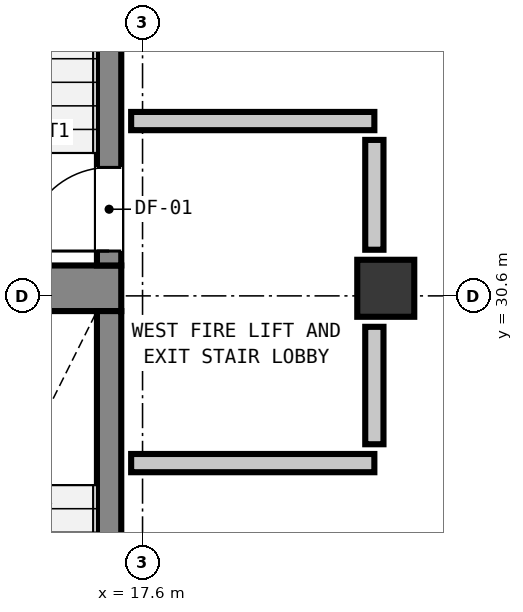
"""IFC4 building model, lengths in metres.
Left out: names, types, materials, properties, quantities, classifications, styles, units other than length and angle.
Written with IfcOpenShell. Run it as: python <this file> out.ifc"""

import sys

from ifc_helpers import new_model, si_unit, direction, frame, frame_2d, origin, origin_2d, place, context, subcontext, project, spatial, rectangle, extrude, element, fill, save


model = new_model("IFC4")
c1 = context("Model", 3, precision=1e-05, world=origin(), true_north=direction((0.0, 1.0)))
c2 = subcontext(c1, "Body", "Model", "MODEL_VIEW")
j1 = project(units=[si_unit("LENGTHUNIT", "METRE"), si_unit("PLANEANGLEUNIT", "RADIAN")], contexts=[c1])
p1 = place(None, origin())
s1 = spatial("IfcSite", under=j1, at=p1, CompositionType="ELEMENT")
p2 = place(p1, origin())
s2 = spatial("IfcBuilding", under=s1, at=p2, CompositionType="ELEMENT")
p3 = place(p2, frame((0.0, 0.0, 282.98)))
s3 = spatial("IfcBuildingStorey", under=s2, at=p3, CompositionType="ELEMENT", Elevation=282.98)
p4 = place(p3, frame((13.24, 30.7, 0.0), z_axis=(0.0, 0.0, 1.0), x_axis=(1.0, 0.0, 0.0)))
e1 = element("IfcWall", 1, at=p4, inside=s3, PredefinedType="SHEAR", context=c2, shape_type="SweptSolid", body=[
    extrude(rectangle(XDim=4.08, YDim=0.6, at=frame_2d((2.04, 0.0))), origin(), (0.0, 0.0, 1.0), 4.9),
])
p5 = place(p3, frame((17.16, 31.0, 0.0), z_axis=(0.0, 0.0, 1.0), x_axis=(0.0, 1.0, 0.0)))
e2 = element("IfcWall", 2, at=p5, inside=s3, PredefinedType="SHEAR", context=c2, shape_type="SweptSolid", body=[
    extrude(rectangle(XDim=7.8, YDim=0.32, at=frame_2d((3.9, 0.0))), origin(), (0.0, 0.0, 1.0), 4.9),
])
p6 = place(p5, frame((0.19, 0.0, 0.0)))
e3 = element("IfcOpeningElement", 3, at=p6, cuts=e2, PredefinedType="OPENING", context=c2, shape_type="SweptSolid", body=[
    extrude(rectangle(XDim=1.1, YDim=2.15, at=frame_2d((0.55, 1.075))), frame((0.0, 0.17, 0.0), z_axis=(0.0, -1.0, 0.0), x_axis=(1.0, 0.0, 0.0)), (0.0, 0.0, 1.0), 0.34),
])
p7 = place(p3, frame((17.16, 22.3, 0.0), z_axis=(0.0, 0.0, 1.0), x_axis=(0.0, 1.0, 0.0)))
e4 = element("IfcWall", 4, at=p7, inside=s3, PredefinedType="SHEAR", context=c2, shape_type="SweptSolid", body=[
    extrude(rectangle(XDim=8.1, YDim=0.32, at=frame_2d((4.05, 0.0))), origin(), (0.0, 0.0, 1.0), 4.9),
])
p8 = place(p7, frame((0.49, 0.0, 0.0)))
e5 = element("IfcOpeningElement", 5, at=p8, cuts=e4, PredefinedType="OPENING", context=c2, shape_type="SweptSolid", body=[
    extrude(rectangle(XDim=1.1, YDim=2.15, at=frame_2d((0.55, 1.075))), frame((0.0, 0.17, 0.0), z_axis=(0.0, -1.0, 0.0), x_axis=(1.0, 0.0, 0.0)), (0.0, 0.0, 1.0), 0.34),
])
p9 = place(p3, frame((20.8, 30.7, 0.0), z_axis=(0.0, 0.0, 1.0), x_axis=(1.0, 0.0, 0.0)))
e6 = element("IfcColumn", 6, at=p9, inside=s3, PredefinedType="COLUMN", context=c2, shape_type="SweptSolid", body=[
    extrude(rectangle(XDim=0.75, YDim=0.75, at=origin_2d()), origin(), (0.0, 0.0, 1.0), 4.9),
])
for number, where, z_axis, x_axis in (
    (7, (17.45, 28.4, 0.0), (0.0, 0.0, 1.0), (1.0, 0.0, 0.0)),
    (8, (17.45, 32.9, 0.0), (0.0, 0.0, 1.0), (1.0, 0.0, 0.0)),
):
    element("IfcWall", number, at=place(p3, frame(where, z_axis=z_axis, x_axis=x_axis)), inside=s3, PredefinedType="PARTITIONING", context=c2, shape_type="SweptSolid", body=[
        extrude(rectangle(XDim=3.2, YDim=0.24, at=frame_2d((1.6, 0.0))), origin(), (0.0, 0.0, 1.0), 4.62),
    ])
p10 = place(p3, frame((20.65, 28.648, 0.0), z_axis=(0.0, 0.0, 1.0), x_axis=(0.0, 1.0, 0.0)))
e9 = element("IfcWall", 9, at=p10, inside=s3, PredefinedType="PARTITIONING", context=c2, shape_type="SweptSolid", body=[
    extrude(rectangle(XDim=1.545, YDim=0.24, at=frame_2d((0.772, 0.0))), origin(), (0.0, 0.0, 1.0), 3.912),
])
p11 = place(p3, frame((20.65, 31.207, 0.0), z_axis=(0.0, 0.0, 1.0), x_axis=(0.0, 1.0, 0.0)))
e10 = element("IfcWall", 10, at=p11, inside=s3, PredefinedType="PARTITIONING", context=c2, shape_type="SweptSolid", body=[
    extrude(rectangle(XDim=1.445, YDim=0.24, at=frame_2d((0.723, 0.0))), origin(), (0.0, 0.0, 1.0), 3.912),
])
p12 = place(p6, origin())
e11 = element("IfcDoor", 11, at=p12, inside=s3, OperationType="SINGLE_SWING_LEFT", PredefinedType="DOOR", context=c2, shape_type="SweptSolid", body=[
    extrude(rectangle(XDim=1.1, YDim=2.15, at=frame_2d((0.55, 1.075))), frame((0.0, 0.025, 0.0), z_axis=(0.0, -1.0, 0.0), x_axis=(1.0, 0.0, 0.0)), (0.0, 0.0, 1.0), 0.05),
])
fill(e3, e11)
save(model, sys.argv[1])
